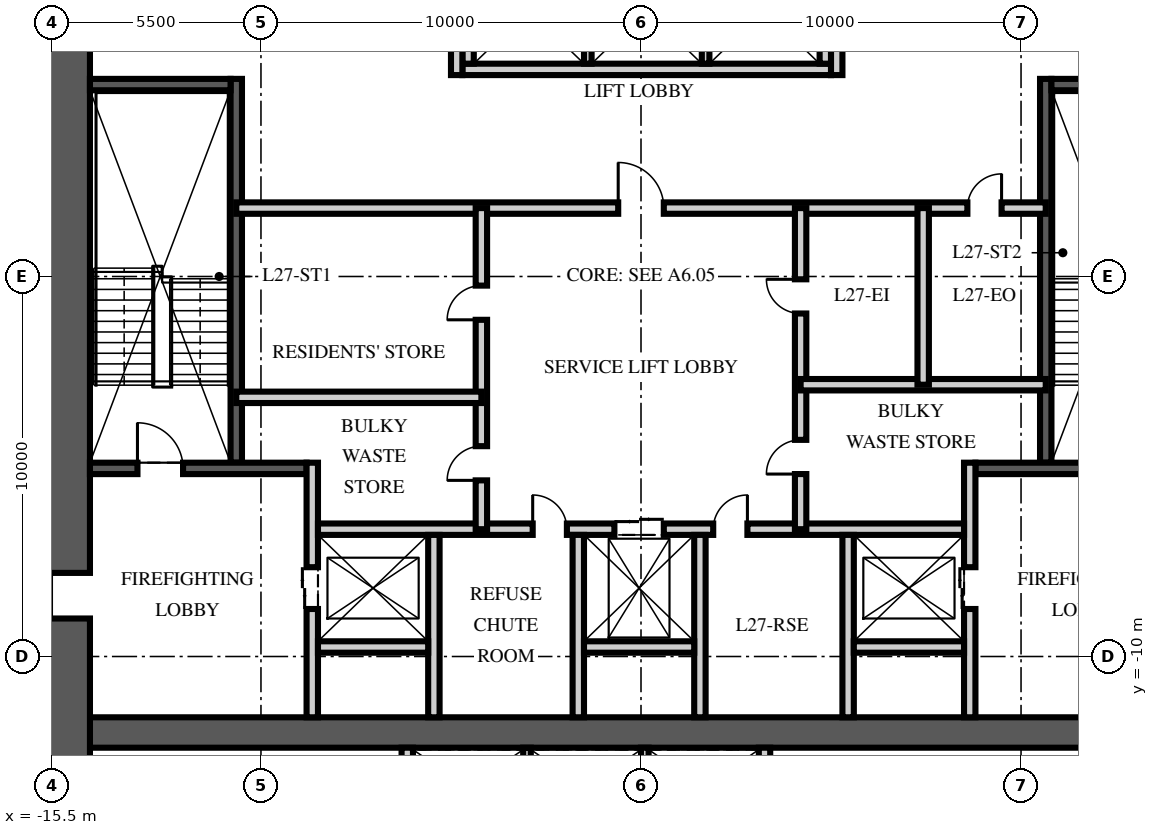
"""IFC4 building model, lengths in metres.
Left out: names, types, materials, properties, quantities, classifications, styles, units other than length and angle.
Written with IfcOpenShell. Run it as: python <this file> out.ifc"""

import sys

from ifc_helpers import new_model, si_unit, direction, frame, frame_2d, origin, place, context, subcontext, project, spatial, rectangle, extrude, element, fill, save


model = new_model("IFC4")
c1 = context("Model", 3, precision=1e-05, world=origin(), true_north=direction((0.0, 1.0)))
c2 = subcontext(c1, "Body", "Model", "MODEL_VIEW")
j1 = project(units=[si_unit("LENGTHUNIT", "METRE"), si_unit("PLANEANGLEUNIT", "RADIAN")], contexts=[c1])
p1 = place(None, origin())
s1 = spatial("IfcSite", under=j1, at=p1, CompositionType="ELEMENT")
p2 = place(p1, origin())
s2 = spatial("IfcBuilding", under=s1, at=p2, CompositionType="ELEMENT")
p3 = place(p2, frame((0.0, 0.0, 111.0)))
s3 = spatial("IfcBuildingStorey", under=s2, at=p3, CompositionType="ELEMENT", Elevation=111.0)
p4 = place(p3, frame((-15.5, -12.0, -0.25), z_axis=(0.0, 0.0, 1.0), x_axis=(1.0, 0.0, 0.0)))
e1 = element("IfcWall", 1, at=p4, inside=s3, PredefinedType="SHEAR", context=c2, shape_type="SweptSolid", body=[
    extrude(rectangle(XDim=31.0, YDim=0.8, at=frame_2d((15.5, 0.0))), origin(), (0.0, 0.0, 1.0), 3.75),
])
p5 = place(p3, frame((-15.5, -15.5, -0.25), z_axis=(0.0, 0.0, 1.0), x_axis=(0.0, 1.0, 0.0)))
e2 = element("IfcWall", 2, at=p5, inside=s3, PredefinedType="SHEAR", context=c2, shape_type="SweptSolid", body=[
    extrude(rectangle(XDim=31.0, YDim=2.0, at=frame_2d((15.5, 0.0))), origin(), (0.0, 0.0, 1.0), 3.75),
])
p6 = place(p5, frame((6.5, 0.0, 0.25)))
e3 = element("IfcOpeningElement", 3, at=p6, cuts=e2, PredefinedType="OPENING", context=c2, shape_type="SweptSolid", body=[
    extrude(rectangle(XDim=1.2, YDim=2.1, at=frame_2d((0.6, 1.05))), frame((0.0, 1.01, 0.0), z_axis=(0.0, -1.0, 0.0), x_axis=(1.0, 0.0, 0.0)), (0.0, 0.0, 1.0), 2.02),
])
p7 = place(p5, frame((23.0, 0.0, 0.25)))
e4 = element("IfcOpeningElement", 4, at=p7, cuts=e2, PredefinedType="OPENING", context=c2, shape_type="SweptSolid", body=[
    extrude(rectangle(XDim=1.8, YDim=2.1, at=frame_2d((0.9, 1.05))), frame((0.0, 1.01, 0.0), z_axis=(0.0, -1.0, 0.0), x_axis=(1.0, 0.0, 0.0)), (0.0, 0.0, 1.0), 2.02),
])
p8 = place(p3, frame((-10.65, -4.9, 0.0), z_axis=(0.0, 0.0, 1.0), x_axis=(0.0, 1.0, 0.0)))
e5 = element("IfcWall", 5, at=p8, inside=s3, PredefinedType="SOLIDWALL", context=c2, shape_type="SweptSolid", body=[
    extrude(rectangle(XDim=10.1, YDim=0.3, at=frame_2d((5.05, 0.0))), origin(), (0.0, 0.0, 1.0), 3.5),
])
p9 = place(p3, frame((-14.5, -5.05, 0.0), z_axis=(0.0, 0.0, 1.0), x_axis=(1.0, 0.0, 0.0)))
e6 = element("IfcWall", 6, at=p9, inside=s3, PredefinedType="SOLIDWALL", context=c2, shape_type="SweptSolid", body=[
    extrude(rectangle(XDim=5.7, YDim=0.3, at=frame_2d((2.85, 0.0))), origin(), (0.0, 0.0, 1.0), 3.5),
])
p10 = place(p9, frame((1.25, 0.0, 0.0)))
e7 = element("IfcOpeningElement", 7, at=p10, cuts=e6, PredefinedType="OPENING", context=c2, shape_type="SweptSolid", body=[
    extrude(rectangle(XDim=1.2, YDim=2.1, at=frame_2d((0.6, 1.05))), frame((0.0, 0.16, 0.0), z_axis=(0.0, -1.0, 0.0), x_axis=(1.0, 0.0, 0.0)), (0.0, 0.0, 1.0), 0.32),
])
p11 = place(p3, frame((-14.5, 5.05, 0.0), z_axis=(0.0, 0.0, 1.0), x_axis=(1.0, 0.0, 0.0)))
e8 = element("IfcWall", 8, at=p11, inside=s3, PredefinedType="SOLIDWALL", context=c2, shape_type="SweptSolid", body=[
    extrude(rectangle(XDim=3.7, YDim=0.3, at=frame_2d((1.85, 0.0))), origin(), (0.0, 0.0, 1.0), 3.5),
])
p12 = place(p3, frame((-8.65, -11.6, 0.0), z_axis=(0.0, 0.0, 1.0), x_axis=(0.0, 1.0, 0.0)))
e9 = element("IfcWall", 9, at=p12, inside=s3, PredefinedType="PARTITIONING", context=c2, shape_type="SweptSolid", body=[
    extrude(rectangle(XDim=6.7, YDim=0.3, at=frame_2d((3.35, 0.0))), origin(), (0.0, 0.0, 1.0), 3.5),
])
p13 = place(p12, frame((2.85, 0.0, 0.0)))
e10 = element("IfcOpeningElement", 10, at=p13, cuts=e9, PredefinedType="OPENING", context=c2, shape_type="SweptSolid", body=[
    extrude(rectangle(XDim=1.1, YDim=2.1, at=frame_2d((0.55, 1.05))), frame((0.0, 0.16, 0.0), z_axis=(0.0, -1.0, 0.0), x_axis=(1.0, 0.0, 0.0)), (0.0, 0.0, 1.0), 0.32),
])
p14 = place(p3, frame((10.65, -4.9, 0.0), z_axis=(0.0, 0.0, 1.0), x_axis=(0.0, 1.0, 0.0)))
e11 = element("IfcWall", 11, at=p14, inside=s3, PredefinedType="SOLIDWALL", context=c2, shape_type="SweptSolid", body=[
    extrude(rectangle(XDim=10.1, YDim=0.3, at=frame_2d((5.05, 0.0))), origin(), (0.0, 0.0, 1.0), 3.5),
])
p15 = place(p3, frame((14.5, -5.05, 0.0), z_axis=(0.0, 0.0, 1.0), x_axis=(-1.0, 0.0, 0.0)))
e12 = element("IfcWall", 12, at=p15, inside=s3, PredefinedType="SOLIDWALL", context=c2, shape_type="SweptSolid", body=[
    extrude(rectangle(XDim=5.7, YDim=0.3, at=frame_2d((2.85, 0.0))), origin(), (0.0, 0.0, 1.0), 3.5),
])
p16 = place(p15, frame((1.25, 0.0, 0.0)))
e13 = element("IfcOpeningElement", 13, at=p16, cuts=e12, PredefinedType="OPENING", context=c2, shape_type="SweptSolid", body=[
    extrude(rectangle(XDim=1.2, YDim=2.1, at=frame_2d((0.6, 1.05))), frame((0.0, 0.16, 0.0), z_axis=(0.0, -1.0, 0.0), x_axis=(1.0, 0.0, 0.0)), (0.0, 0.0, 1.0), 0.32),
])
p17 = place(p3, frame((14.5, 5.05, 0.0), z_axis=(0.0, 0.0, 1.0), x_axis=(-1.0, 0.0, 0.0)))
e14 = element("IfcWall", 14, at=p17, inside=s3, PredefinedType="SOLIDWALL", context=c2, shape_type="SweptSolid", body=[
    extrude(rectangle(XDim=3.7, YDim=0.3, at=frame_2d((1.85, 0.0))), origin(), (0.0, 0.0, 1.0), 3.5),
])
p18 = place(p3, frame((8.65, -11.6, 0.0), z_axis=(0.0, 0.0, 1.0), x_axis=(0.0, 1.0, 0.0)))
e15 = element("IfcWall", 15, at=p18, inside=s3, PredefinedType="PARTITIONING", context=c2, shape_type="SweptSolid", body=[
    extrude(rectangle(XDim=6.7, YDim=0.3, at=frame_2d((3.35, 0.0))), origin(), (0.0, 0.0, 1.0), 3.5),
])
p19 = place(p18, frame((2.85, 0.0, 0.0)))
e16 = element("IfcOpeningElement", 16, at=p19, cuts=e15, PredefinedType="OPENING", context=c2, shape_type="SweptSolid", body=[
    extrude(rectangle(XDim=1.1, YDim=2.1, at=frame_2d((0.55, 1.05))), frame((0.0, 0.16, 0.0), z_axis=(0.0, -1.0, 0.0), x_axis=(1.0, 0.0, 0.0)), (0.0, 0.0, 1.0), 0.32),
])
p20 = place(p3, frame((-8.5, -6.65, 0.0), z_axis=(0.0, 0.0, 1.0), x_axis=(1.0, 0.0, 0.0)))
e17 = element("IfcWall", 17, at=p20, inside=s3, PredefinedType="PARTITIONING", context=c2, shape_type="SweptSolid", body=[
    extrude(rectangle(XDim=17.0, YDim=0.3, at=frame_2d((8.5, 0.0))), origin(), (0.0, 0.0, 1.0), 3.5),
])
p21 = place(p20, frame((7.8, 0.0, 0.0)))
e18 = element("IfcOpeningElement", 18, at=p21, cuts=e17, PredefinedType="OPENING", context=c2, shape_type="SweptSolid", body=[
    extrude(rectangle(XDim=1.3, YDim=2.4, at=frame_2d((0.65, 1.2))), frame((0.0, 0.16, 0.0), z_axis=(0.0, -1.0, 0.0), x_axis=(1.0, 0.0, 0.0)), (0.0, 0.0, 1.0), 0.32),
])
p22 = place(p20, frame((5.65, 0.0, 0.0)))
e19 = element("IfcOpeningElement", 19, at=p22, cuts=e17, PredefinedType="OPENING", context=c2, shape_type="SweptSolid", body=[
    extrude(rectangle(XDim=0.9, YDim=2.1, at=frame_2d((0.45, 1.05))), frame((0.0, 0.16, 0.0), z_axis=(0.0, -1.0, 0.0), x_axis=(1.0, 0.0, 0.0)), (0.0, 0.0, 1.0), 0.32),
])
p23 = place(p20, frame((10.4, 0.0, 0.0)))
e20 = element("IfcOpeningElement", 20, at=p23, cuts=e17, PredefinedType="OPENING", context=c2, shape_type="SweptSolid", body=[
    extrude(rectangle(XDim=0.9, YDim=2.1, at=frame_2d((0.45, 1.05))), frame((0.0, 0.16, 0.0), z_axis=(0.0, -1.0, 0.0), x_axis=(1.0, 0.0, 0.0)), (0.0, 0.0, 1.0), 0.32),
])
for number, where, z_axis, x_axis in (
    (21, (-5.45, -11.6, 0.0), (0.0, 0.0, 1.0), (0.0, 1.0, 0.0)),
    (22, (-1.65, -11.6, 0.0), (0.0, 0.0, 1.0), (0.0, 1.0, 0.0)),
    (23, (1.55, -11.6, 0.0), (0.0, 0.0, 1.0), (0.0, 1.0, 0.0)),
    (24, (5.45, -11.6, 0.0), (0.0, 0.0, 1.0), (0.0, 1.0, 0.0)),
):
    element("IfcWall", number, at=place(p3, frame(where, z_axis=z_axis, x_axis=x_axis)), inside=s3, PredefinedType="PARTITIONING", context=c2, shape_type="SweptSolid", body=[
        extrude(rectangle(XDim=4.8, YDim=0.3, at=frame_2d((2.4, 0.0))), origin(), (0.0, 0.0, 1.0), 3.5),
    ])
for number, where, z_axis, x_axis in (
    (25, (-8.5, -9.75, 0.0), (0.0, 0.0, 1.0), (1.0, 0.0, 0.0)),
    (26, (-1.5, -9.75, 0.0), (0.0, 0.0, 1.0), (1.0, 0.0, 0.0)),
    (27, (5.6, -9.75, 0.0), (0.0, 0.0, 1.0), (1.0, 0.0, 0.0)),
):
    element("IfcWall", number, at=place(p3, frame(where, z_axis=z_axis, x_axis=x_axis)), inside=s3, PredefinedType="PARTITIONING", context=c2, shape_type="SweptSolid", body=[
        extrude(rectangle(XDim=2.9, YDim=0.3, at=frame_2d((1.45, 0.0))), origin(), (0.0, 0.0, 1.0), 3.5),
    ])
p24 = place(p3, frame((-4.7, 5.45, 0.0), z_axis=(0.0, 0.0, 1.0), x_axis=(1.0, 0.0, 0.0)))
e28 = element("IfcWall", 28, at=p24, inside=s3, PredefinedType="PARTITIONING", context=c2, shape_type="SweptSolid", body=[
    extrude(rectangle(XDim=9.7, YDim=0.3, at=frame_2d((4.85, 0.0))), origin(), (0.0, 0.0, 1.0), 3.5),
])
for number, where, z_axis, x_axis in (
    (29, (-4.55, 5.6, 0.0), (0.0, 0.0, 1.0), (0.0, 1.0, 0.0)),
    (30, (4.85, 5.6, 0.0), (0.0, 0.0, 1.0), (0.0, 1.0, 0.0)),
):
    element("IfcWall", number, at=place(p3, frame(where, z_axis=z_axis, x_axis=x_axis)), inside=s3, PredefinedType="PARTITIONING", context=c2, shape_type="SweptSolid", body=[
        extrude(rectangle(XDim=2.8, YDim=0.3, at=frame_2d((1.4, 0.0))), origin(), (0.0, 0.0, 1.0), 3.5),
    ])
for number, where, z_axis, x_axis in (
    (31, (-1.4, 5.6, 0.0), (0.0, 0.0, 1.0), (0.0, 1.0, 0.0)),
    (32, (1.7, 5.6, 0.0), (0.0, 0.0, 1.0), (0.0, 1.0, 0.0)),
):
    element("IfcWall", number, at=place(p3, frame(where, z_axis=z_axis, x_axis=x_axis)), inside=s3, PredefinedType="PARTITIONING", context=c2, shape_type="SweptSolid", body=[
        extrude(rectangle(XDim=2.8, YDim=0.2, at=frame_2d((1.4, 0.0))), origin(), (0.0, 0.0, 1.0), 3.5),
    ])
for number, where, z_axis, x_axis in (
    (33, (-6.15, -14.5, 0.0), (0.0, 0.0, 1.0), (0.0, 1.0, 0.0)),
    (34, (3.25, -14.5, 0.0), (0.0, 0.0, 1.0), (0.0, 1.0, 0.0)),
):
    element("IfcWall", number, at=place(p3, frame(where, z_axis=z_axis, x_axis=x_axis)), inside=s3, PredefinedType="PARTITIONING", context=c2, shape_type="SweptSolid", body=[
        extrude(rectangle(XDim=2.1, YDim=0.3, at=frame_2d((1.05, 0.0))), origin(), (0.0, 0.0, 1.0), 3.5),
    ])
for number, where, z_axis, x_axis in (
    (35, (-3.0, -14.5, 0.0), (0.0, 0.0, 1.0), (0.0, 1.0, 0.0)),
    (36, (0.1, -14.5, 0.0), (0.0, 0.0, 1.0), (0.0, 1.0, 0.0)),
):
    element("IfcWall", number, at=place(p3, frame(where, z_axis=z_axis, x_axis=x_axis)), inside=s3, PredefinedType="PARTITIONING", context=c2, shape_type="SweptSolid", body=[
        extrude(rectangle(XDim=2.1, YDim=0.2, at=frame_2d((1.05, 0.0))), origin(), (0.0, 0.0, 1.0), 3.5),
    ])
p25 = place(p3, frame((-10.65, 1.8, 0.0), z_axis=(0.0, 0.0, 1.0), x_axis=(1.0, 0.0, 0.0)))
e37 = element("IfcWall", 37, at=p25, inside=s3, PredefinedType="PARTITIONING", context=c2, shape_type="SweptSolid", body=[
    extrude(rectangle(XDim=21.3, YDim=0.3, at=frame_2d((10.65, 0.0))), origin(), (0.0, 0.0, 1.0), 3.5),
])
p26 = place(p25, frame((10.05, 0.0, 0.0)))
e38 = element("IfcOpeningElement", 38, at=p26, cuts=e37, PredefinedType="OPENING", context=c2, shape_type="SweptSolid", body=[
    extrude(rectangle(XDim=1.2, YDim=2.1, at=frame_2d((0.6, 1.05))), frame((0.0, 0.16, 0.0), z_axis=(0.0, -1.0, 0.0), x_axis=(1.0, 0.0, 0.0)), (0.0, 0.0, 1.0), 0.32),
])
p27 = place(p25, frame((19.238, 0.0, 0.0)))
e39 = element("IfcOpeningElement", 39, at=p27, cuts=e37, PredefinedType="OPENING", context=c2, shape_type="SweptSolid", body=[
    extrude(rectangle(XDim=0.9, YDim=2.1, at=frame_2d((0.45, 1.05))), frame((0.0, 0.16, 0.0), z_axis=(0.0, -1.0, 0.0), x_axis=(1.0, 0.0, 0.0)), (0.0, 0.0, 1.0), 0.32),
])
p28 = place(p3, frame((-4.2, -6.65, 0.0), z_axis=(0.0, 0.0, 1.0), x_axis=(0.0, 1.0, 0.0)))
e40 = element("IfcWall", 40, at=p28, inside=s3, PredefinedType="PARTITIONING", context=c2, shape_type="SweptSolid", body=[
    extrude(rectangle(XDim=8.45, YDim=0.3, at=frame_2d((4.225, 0.0))), origin(), (0.0, 0.0, 1.0), 3.5),
])
p29 = place(p28, frame((1.285, 0.0, 0.0)))
e41 = element("IfcOpeningElement", 41, at=p29, cuts=e40, PredefinedType="OPENING", context=c2, shape_type="SweptSolid", body=[
    extrude(rectangle(XDim=0.9, YDim=2.1, at=frame_2d((0.45, 1.05))), frame((0.0, 0.16, 0.0), z_axis=(0.0, -1.0, 0.0), x_axis=(1.0, 0.0, 0.0)), (0.0, 0.0, 1.0), 0.32),
])
p30 = place(p28, frame((5.51, 0.0, 0.0)))
e42 = element("IfcOpeningElement", 42, at=p30, cuts=e40, PredefinedType="OPENING", context=c2, shape_type="SweptSolid", body=[
    extrude(rectangle(XDim=0.9, YDim=2.1, at=frame_2d((0.45, 1.05))), frame((0.0, 0.16, 0.0), z_axis=(0.0, -1.0, 0.0), x_axis=(1.0, 0.0, 0.0)), (0.0, 0.0, 1.0), 0.32),
])
p31 = place(p3, frame((4.2, -6.65, 0.0), z_axis=(0.0, 0.0, 1.0), x_axis=(0.0, 1.0, 0.0)))
e43 = element("IfcWall", 43, at=p31, inside=s3, PredefinedType="PARTITIONING", context=c2, shape_type="SweptSolid", body=[
    extrude(rectangle(XDim=8.45, YDim=0.3, at=frame_2d((4.225, 0.0))), origin(), (0.0, 0.0, 1.0), 3.5),
])
p32 = place(p31, frame((1.451, 0.0, 0.0)))
e44 = element("IfcOpeningElement", 44, at=p32, cuts=e43, PredefinedType="OPENING", context=c2, shape_type="SweptSolid", body=[
    extrude(rectangle(XDim=0.9, YDim=2.1, at=frame_2d((0.45, 1.05))), frame((0.0, 0.16, 0.0), z_axis=(0.0, -1.0, 0.0), x_axis=(1.0, 0.0, 0.0)), (0.0, 0.0, 1.0), 0.32),
])
p33 = place(p31, frame((5.676, 0.0, 0.0)))
e45 = element("IfcOpeningElement", 45, at=p33, cuts=e43, PredefinedType="OPENING", context=c2, shape_type="SweptSolid", body=[
    extrude(rectangle(XDim=0.9, YDim=2.1, at=frame_2d((0.45, 1.05))), frame((0.0, 0.16, 0.0), z_axis=(0.0, -1.0, 0.0), x_axis=(1.0, 0.0, 0.0)), (0.0, 0.0, 1.0), 0.32),
])
for number, where, z_axis, x_axis in (
    (46, (-10.65, -3.18, 0.0), (0.0, 0.0, 1.0), (1.0, 0.0, 0.0)),
    (47, (10.65, -2.848, 0.0), (0.0, 0.0, 1.0), (-1.0, 0.0, 0.0)),
):
    element("IfcWall", number, at=place(p3, frame(where, z_axis=z_axis, x_axis=x_axis)), inside=s3, PredefinedType="PARTITIONING", context=c2, shape_type="SweptSolid", body=[
        extrude(rectangle(XDim=6.45, YDim=0.3, at=frame_2d((3.225, 0.0))), origin(), (0.0, 0.0, 1.0), 3.5),
    ])
p34 = place(p3, frame((7.425, -2.848, 0.0), z_axis=(0.0, 0.0, 1.0), x_axis=(0.0, 1.0, 0.0)))
e48 = element("IfcWall", 48, at=p34, inside=s3, PredefinedType="PARTITIONING", context=c2, shape_type="SweptSolid", body=[
    extrude(rectangle(XDim=4.648, YDim=0.3, at=frame_2d((2.324, 0.0))), origin(), (0.0, 0.0, 1.0), 3.5),
])
p35 = place(p3, frame((-4.85, 5.3, 0.0), z_axis=(0.0, 0.0, 1.0), x_axis=(0.0, 1.0, 0.0)))
e49 = element("IfcWall", 49, at=p35, inside=s3, PredefinedType="PARTITIONING", context=c2, shape_type="SweptSolid", body=[
    extrude(rectangle(XDim=6.3, YDim=0.3, at=frame_2d((3.15, 0.0))), origin(), (0.0, 0.0, 1.0), 3.5),
])
p36 = place(p35, frame((4.35, 0.0, 0.0)))
e50 = element("IfcOpeningElement", 50, at=p36, cuts=e49, PredefinedType="OPENING", context=c2, shape_type="SweptSolid", body=[
    extrude(rectangle(XDim=0.9, YDim=2.1, at=frame_2d((0.45, 1.05))), frame((0.0, 0.16, 0.0), z_axis=(0.0, -1.0, 0.0), x_axis=(1.0, 0.0, 0.0)), (0.0, 0.0, 1.0), 0.32),
])
p37 = place(p3, frame((5.15, 5.3, 0.0), z_axis=(0.0, 0.0, 1.0), x_axis=(0.0, 1.0, 0.0)))
e51 = element("IfcWall", 51, at=p37, inside=s3, PredefinedType="PARTITIONING", context=c2, shape_type="SweptSolid", body=[
    extrude(rectangle(XDim=6.3, YDim=0.3, at=frame_2d((3.15, 0.0))), origin(), (0.0, 0.0, 1.0), 3.5),
])
p38 = place(p37, frame((4.35, 0.0, 0.0)))
e52 = element("IfcOpeningElement", 52, at=p38, cuts=e51, PredefinedType="OPENING", context=c2, shape_type="SweptSolid", body=[
    extrude(rectangle(XDim=0.9, YDim=2.1, at=frame_2d((0.45, 1.05))), frame((0.0, 0.16, 0.0), z_axis=(0.0, -1.0, 0.0), x_axis=(1.0, 0.0, 0.0)), (0.0, 0.0, 1.0), 0.32),
])
p39 = place(p10, origin())
e53 = element("IfcDoor", 53, at=p39, inside=s3, OperationType="SINGLE_SWING_LEFT", PredefinedType="DOOR", context=c2, shape_type="SweptSolid", body=[
    extrude(rectangle(XDim=1.2, YDim=2.1, at=frame_2d((0.6, 1.05))), frame((0.0, 0.025, 0.0), z_axis=(0.0, -1.0, 0.0), x_axis=(1.0, 0.0, 0.0)), (0.0, 0.0, 1.0), 0.05),
])
fill(e7, e53)
p40 = place(p6, origin())
e54 = element("IfcDoor", 54, at=p40, inside=s3, OperationType="SINGLE_SWING_LEFT", PredefinedType="DOOR", context=c2, shape_type="SweptSolid", body=[
    extrude(rectangle(XDim=1.2, YDim=2.1, at=frame_2d((0.6, 1.05))), frame((0.0, 0.025, 0.0), z_axis=(0.0, -1.0, 0.0), x_axis=(1.0, 0.0, 0.0)), (0.0, 0.0, 1.0), 0.05),
])
fill(e3, e54)
p41 = place(p13, origin())
e55 = element("IfcDoor", 55, at=p41, inside=s3, OperationType="DOUBLE_DOOR_SLIDING", PredefinedType="DOOR", context=c2, shape_type="SweptSolid", body=[
    extrude(rectangle(XDim=1.1, YDim=2.1, at=frame_2d((0.55, 1.05))), frame((0.0, 0.025, 0.0), z_axis=(0.0, -1.0, 0.0), x_axis=(1.0, 0.0, 0.0)), (0.0, 0.0, 1.0), 0.05),
])
fill(e10, e55)
p42 = place(p19, origin())
e56 = element("IfcDoor", 56, at=p42, inside=s3, OperationType="DOUBLE_DOOR_SLIDING", PredefinedType="DOOR", context=c2, shape_type="SweptSolid", body=[
    extrude(rectangle(XDim=1.1, YDim=2.1, at=frame_2d((0.55, 1.05))), frame((0.0, 0.025, 0.0), z_axis=(0.0, -1.0, 0.0), x_axis=(1.0, 0.0, 0.0)), (0.0, 0.0, 1.0), 0.05),
])
fill(e16, e56)
p43 = place(p21, origin())
e57 = element("IfcDoor", 57, at=p43, inside=s3, OperationType="DOUBLE_DOOR_SLIDING", PredefinedType="DOOR", context=c2, shape_type="SweptSolid", body=[
    extrude(rectangle(XDim=1.3, YDim=2.4, at=frame_2d((0.65, 1.2))), frame((0.0, 0.025, 0.0), z_axis=(0.0, -1.0, 0.0), x_axis=(1.0, 0.0, 0.0)), (0.0, 0.0, 1.0), 0.05),
])
fill(e18, e57)
p44 = place(p26, origin())
e58 = element("IfcDoor", 58, at=p44, inside=s3, OperationType="SINGLE_SWING_LEFT", PredefinedType="DOOR", context=c2, shape_type="SweptSolid", body=[
    extrude(rectangle(XDim=1.2, YDim=2.1, at=frame_2d((0.6, 1.05))), frame((0.0, 0.025, 0.0), z_axis=(0.0, -1.0, 0.0), x_axis=(1.0, 0.0, 0.0)), (0.0, 0.0, 1.0), 0.05),
])
fill(e38, e58)
p45 = place(p22, origin())
e59 = element("IfcDoor", 59, at=p45, inside=s3, OperationType="SINGLE_SWING_LEFT", PredefinedType="DOOR", context=c2, shape_type="SweptSolid", body=[
    extrude(rectangle(XDim=0.9, YDim=2.1, at=frame_2d((0.45, 1.05))), frame((0.0, 0.025, 0.0), z_axis=(0.0, -1.0, 0.0), x_axis=(1.0, 0.0, 0.0)), (0.0, 0.0, 1.0), 0.05),
])
fill(e19, e59)
p46 = place(p23, origin())
e60 = element("IfcDoor", 60, at=p46, inside=s3, OperationType="SINGLE_SWING_RIGHT", PredefinedType="DOOR", context=c2, shape_type="SweptSolid", body=[
    extrude(rectangle(XDim=0.9, YDim=2.1, at=frame_2d((0.45, 1.05))), frame((0.0, 0.025, 0.0), z_axis=(0.0, -1.0, 0.0), x_axis=(1.0, 0.0, 0.0)), (0.0, 0.0, 1.0), 0.05),
])
fill(e20, e60)
p47 = place(p29, origin())
e61 = element("IfcDoor", 61, at=p47, inside=s3, OperationType="SINGLE_SWING_LEFT", PredefinedType="DOOR", context=c2, shape_type="SweptSolid", body=[
    extrude(rectangle(XDim=0.9, YDim=2.1, at=frame_2d((0.45, 1.05))), frame((0.0, 0.025, 0.0), z_axis=(0.0, -1.0, 0.0), x_axis=(1.0, 0.0, 0.0)), (0.0, 0.0, 1.0), 0.05),
])
fill(e41, e61)
p48 = place(p30, origin())
e62 = element("IfcDoor", 62, at=p48, inside=s3, OperationType="SINGLE_SWING_LEFT", PredefinedType="DOOR", context=c2, shape_type="SweptSolid", body=[
    extrude(rectangle(XDim=0.9, YDim=2.1, at=frame_2d((0.45, 1.05))), frame((0.0, 0.025, 0.0), z_axis=(0.0, -1.0, 0.0), x_axis=(1.0, 0.0, 0.0)), (0.0, 0.0, 1.0), 0.05),
])
fill(e42, e62)
p49 = place(p32, origin())
e63 = element("IfcDoor", 63, at=p49, inside=s3, OperationType="SINGLE_SWING_LEFT", PredefinedType="DOOR", context=c2, shape_type="SweptSolid", body=[
    extrude(rectangle(XDim=0.9, YDim=2.1, at=frame_2d((0.45, 1.05))), frame((0.0, 0.025, 0.0), z_axis=(0.0, -1.0, 0.0), x_axis=(1.0, 0.0, 0.0)), (0.0, 0.0, 1.0), 0.05),
])
fill(e44, e63)
p50 = place(p33, origin())
e64 = element("IfcDoor", 64, at=p50, inside=s3, OperationType="SINGLE_SWING_RIGHT", PredefinedType="DOOR", context=c2, shape_type="SweptSolid", body=[
    extrude(rectangle(XDim=0.9, YDim=2.1, at=frame_2d((0.45, 1.05))), frame((0.0, 0.025, 0.0), z_axis=(0.0, -1.0, 0.0), x_axis=(1.0, 0.0, 0.0)), (0.0, 0.0, 1.0), 0.05),
])
fill(e45, e64)
p51 = place(p27, origin())
e65 = element("IfcDoor", 65, at=p51, inside=s3, OperationType="SINGLE_SWING_RIGHT", PredefinedType="DOOR", context=c2, shape_type="SweptSolid", body=[
    extrude(rectangle(XDim=0.9, YDim=2.1, at=frame_2d((0.45, 1.05))), frame((0.0, 0.025, 0.0), z_axis=(0.0, -1.0, 0.0), x_axis=(1.0, 0.0, 0.0)), (0.0, 0.0, 1.0), 0.05),
])
fill(e39, e65)
save(model, sys.argv[1])
